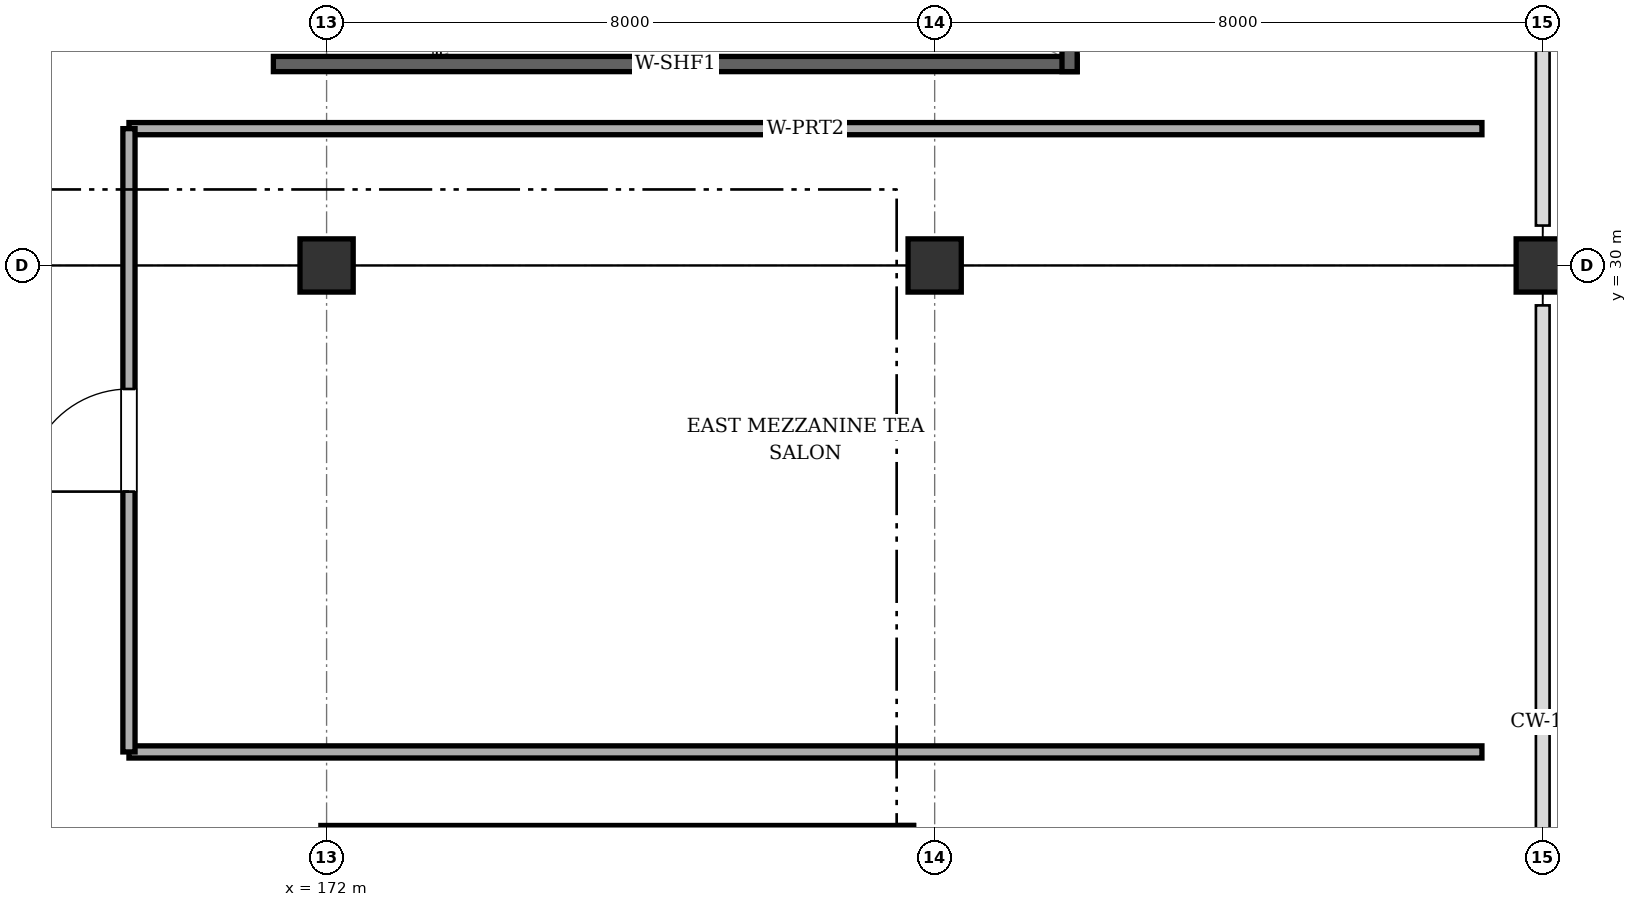
"""IFC4 building model, lengths in metres.
Left out: names, types, materials, properties, quantities, classifications, styles, units other than length and angle.
Written with IfcOpenShell. Run it as: python <this file> out.ifc"""

import sys

from ifc_helpers import new_model, si_unit, direction, frame, frame_2d, origin, origin_2d, place, context, subcontext, project, spatial, rectangle, extrude, element, fill, save


model = new_model("IFC4")
c1 = context("Model", 3, precision=1e-05, world=origin(), true_north=direction((0.0, 1.0)))
c2 = subcontext(c1, "Body", "Model", "MODEL_VIEW")
j1 = project(units=[si_unit("LENGTHUNIT", "METRE"), si_unit("PLANEANGLEUNIT", "RADIAN")], contexts=[c1])
p1 = place(None, origin())
s1 = spatial("IfcSite", under=j1, at=p1, CompositionType="ELEMENT")
p2 = place(p1, origin())
s2 = spatial("IfcBuilding", under=s1, at=p2, CompositionType="ELEMENT")
p3 = place(p2, frame((0.0, 0.0, 6.6)))
s3 = spatial("IfcBuildingStorey", under=s2, at=p3, CompositionType="ELEMENT", Elevation=6.6)
for number, where, z_axis, x_axis in (
    (1, (172.0, 30.0, 0.0), (0.0, 0.0, 1.0), (1.0, 0.0, 0.0)),
    (2, (180.0, 30.0, 0.0), (0.0, 0.0, 1.0), (1.0, 0.0, 0.0)),
    (3, (188.0, 30.0, 0.0), (0.0, 0.0, 1.0), (1.0, 0.0, 0.0)),
):
    element("IfcColumn", number, at=place(p3, frame(where, z_axis=z_axis, x_axis=x_axis)), inside=s3, PredefinedType="COLUMN", context=c2, shape_type="SweptSolid", body=[
        extrude(rectangle(XDim=0.7, YDim=0.7, at=origin_2d()), origin(), (0.0, 0.0, 1.0), 4.2),
    ])
p4 = place(p3, frame((171.3, 32.65, 0.0), z_axis=(0.0, 0.0, 1.0), x_axis=(1.0, 0.0, 0.0)))
e4 = element("IfcWall", 4, at=p4, inside=s3, PredefinedType="SOLIDWALL", context=c2, shape_type="SweptSolid", body=[
    extrude(rectangle(XDim=10.575, YDim=0.2, at=frame_2d((5.288, 0.0))), origin(), (0.0, 0.0, 1.0), 1.25),
])
p5 = place(p3, frame((181.775, 32.55, 0.0), z_axis=(0.0, 0.0, 1.0), x_axis=(0.0, 1.0, 0.0)))
e5 = element("IfcWall", 5, at=p5, inside=s3, PredefinedType="SOLIDWALL", context=c2, shape_type="SweptSolid", body=[
    extrude(rectangle(XDim=4.4, YDim=0.2, at=frame_2d((2.2, 0.0))), origin(), (0.0, 0.0, 1.0), 1.25),
])
p6 = place(p3, frame((179.722, 22.532, 0.0), z_axis=(0.0, 0.0, 1.0), x_axis=(-1.0, 0.0, 0.0)))
e6 = element("IfcWall", 6, at=p6, inside=s3, PredefinedType="SOLIDWALL", context=c2, shape_type="SweptSolid", body=[
    extrude(rectangle(XDim=7.797, YDim=0.2, at=frame_2d((3.899, 0.0))), origin(), (0.0, 0.0, 1.0), 3.96),
])
p7 = place(p3, frame((179.623, 18.613, 0.0), z_axis=(0.0, 0.0, 1.0), x_axis=(0.0, 1.0, 0.0)))
e7 = element("IfcWall", 7, at=p7, inside=s3, PredefinedType="SOLIDWALL", context=c2, shape_type="SweptSolid", body=[
    extrude(rectangle(XDim=4.02, YDim=0.2, at=frame_2d((2.01, 0.0))), origin(), (0.0, 0.0, 1.0), 3.96),
])
for number, where, z_axis, x_axis in (
    (8, (187.2, 23.6, 0.0), (0.0, 0.0, 1.0), (-1.0, 0.0, 0.0)),
    (9, (169.4, 31.8, 0.0), (0.0, 0.0, 1.0), (1.0, 0.0, 0.0)),
):
    element("IfcWall", number, at=place(p3, frame(where, z_axis=z_axis, x_axis=x_axis)), inside=s3, PredefinedType="PARTITIONING", context=c2, shape_type="SweptSolid", body=[
        extrude(rectangle(XDim=17.8, YDim=0.16, at=frame_2d((8.9, 0.0))), origin(), (0.0, 0.0, 1.0), 3.345),
    ])
p8 = place(p3, frame((169.4, 23.6, 0.0), z_axis=(0.0, 0.0, 1.0), x_axis=(0.0, 1.0, 0.0)))
e10 = element("IfcWall", 10, at=p8, inside=s3, PredefinedType="PARTITIONING", context=c2, shape_type="SweptSolid", body=[
    extrude(rectangle(XDim=8.2, YDim=0.16, at=frame_2d((4.1, 0.0))), origin(), (0.0, 0.0, 1.0), 3.495),
])
p9 = place(p8, frame((3.425, 0.0, 0.0)))
e11 = element("IfcOpeningElement", 11, at=p9, cuts=e10, PredefinedType="OPENING", context=c2, shape_type="SweptSolid", body=[
    extrude(rectangle(XDim=1.35, YDim=2.1, at=frame_2d((0.675, 1.05))), frame((0.0, 0.09, 0.0), z_axis=(0.0, -1.0, 0.0), x_axis=(1.0, 0.0, 0.0)), (0.0, 0.0, 1.0), 0.18),
])
p10 = place(p9, origin())
e12 = element("IfcDoor", 12, at=p10, inside=s3, OperationType="SINGLE_SWING_LEFT", PredefinedType="DOOR", context=c2, shape_type="SweptSolid", body=[
    extrude(rectangle(XDim=1.35, YDim=2.1, at=frame_2d((0.675, 1.05))), frame((0.0, 0.025, 0.0), z_axis=(0.0, -1.0, 0.0), x_axis=(1.0, 0.0, 0.0)), (0.0, 0.0, 1.0), 0.05),
])
fill(e11, e12)
save(model, sys.argv[1])
